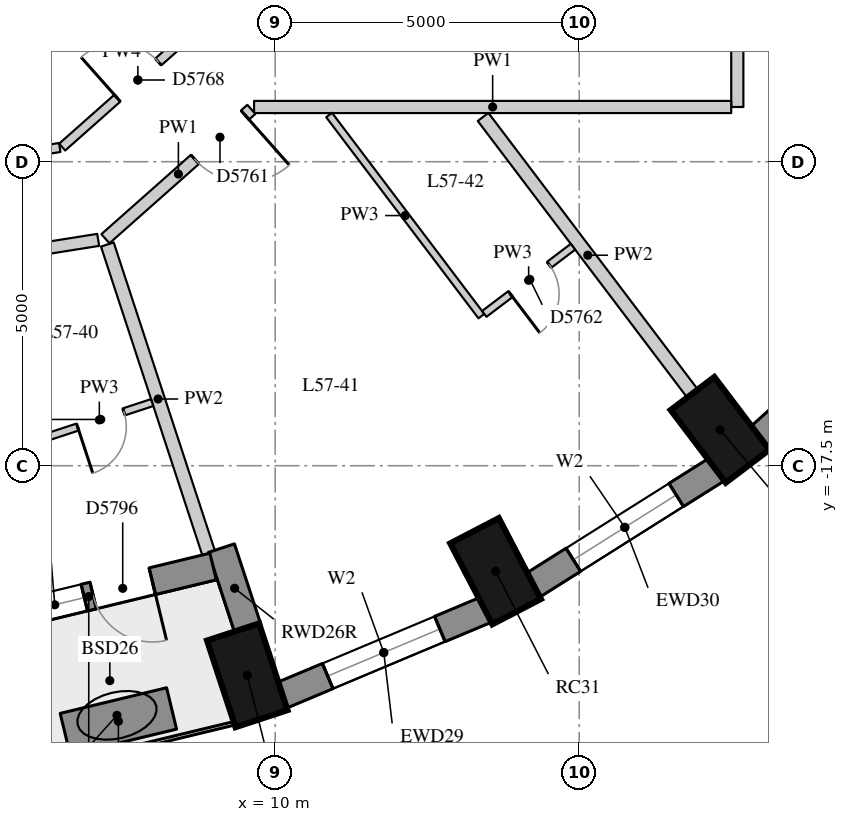
"""IFC4 building model, lengths in metres.
Left out: names, types, materials, properties, quantities, classifications, styles, units other than length and angle.
Written with IfcOpenShell. Run it as: python <this file> out.ifc"""

import sys

from ifc_helpers import new_model, si_unit, direction, frame, frame_2d, origin, origin_2d, place, context, subcontext, project, spatial, rectangle, extrude, element, fill, save


model = new_model("IFC4")
c1 = context("Model", 3, precision=1e-05, world=origin(), true_north=direction((0.0, 1.0)))
c2 = subcontext(c1, "Body", "Model", "MODEL_VIEW")
j1 = project(units=[si_unit("LENGTHUNIT", "METRE"), si_unit("PLANEANGLEUNIT", "RADIAN")], contexts=[c1])
p1 = place(None, origin())
s1 = spatial("IfcSite", under=j1, at=p1, CompositionType="ELEMENT")
p2 = place(p1, origin())
s2 = spatial("IfcBuilding", under=s1, at=p2, CompositionType="ELEMENT")
p3 = place(p2, frame((0.0, 0.0, 202.4)))
s3 = spatial("IfcBuildingStorey", under=s2, at=p3, CompositionType="ELEMENT", Elevation=202.4)
for number, where, z_axis, x_axis in (
    (1, (9.541, -20.948, 0.0), (0.0, 0.0, 1.0), (0.312, -0.95, 0.0)),
    (2, (13.625, -19.235, 0.0), (0.0, 0.0, 1.0), (0.462, -0.887, 0.0)),
    (3, (17.316, -16.911, 0.0), (0.0, 0.0, 1.0), (0.604, -0.797, 0.0)),
):
    element("IfcColumn", number, at=place(p3, frame(where, z_axis=z_axis, x_axis=x_axis)), inside=s3, PredefinedType="COLUMN", context=c2, shape_type="SweptSolid", body=[
        extrude(rectangle(XDim=1.5, YDim=0.9, at=origin_2d()), origin(), (0.0, 0.0, 1.0), 3.3),
    ])
p4 = place(p3, frame((10.103, -21.279, 0.0), z_axis=(0.0, 0.0, 1.0), x_axis=(0.922168222612, 0.386789050006, 0.0)))
e4 = element("IfcWall", 4, at=p4, inside=s3, PredefinedType="SOLIDWALL", context=c2, shape_type="SweptSolid", body=[
    extrude(rectangle(XDim=3.651, YDim=0.45, at=frame_2d((1.825, 0.0))), origin(), (0.0, 0.0, 1.0), 3.02),
])
p5 = place(p4, frame((0.825, 0.0, 0.4)))
e5 = element("IfcOpeningElement", 5, at=p5, cuts=e4, PredefinedType="OPENING", context=c2, shape_type="SweptSolid", body=[
    extrude(rectangle(XDim=2.0, YDim=1.75, at=frame_2d((1.0, 0.875))), frame((0.0, 0.235, 0.0), z_axis=(0.0, -1.0, 0.0), x_axis=(1.0, 0.0, 0.0)), (0.0, 0.0, 1.0), 0.47),
])
p6 = place(p3, frame((14.232, -19.47, 0.0), z_axis=(0.0, 0.0, 1.0), x_axis=(0.84614984472, 0.532945063098, 0.0)))
e6 = element("IfcWall", 6, at=p6, inside=s3, PredefinedType="SOLIDWALL", context=c2, shape_type="SweptSolid", body=[
    extrude(rectangle(XDim=3.586, YDim=0.45, at=frame_2d((1.793, 0.0))), origin(), (0.0, 0.0, 1.0), 3.02),
])
p7 = place(p6, frame((0.793, 0.0, 0.4)))
e7 = element("IfcOpeningElement", 7, at=p7, cuts=e6, PredefinedType="OPENING", context=c2, shape_type="SweptSolid", body=[
    extrude(rectangle(XDim=2.0, YDim=1.75, at=frame_2d((1.0, 0.875))), frame((0.0, 0.235, 0.0), z_axis=(0.0, -1.0, 0.0), x_axis=(1.0, 0.0, 0.0)), (0.0, 0.0, 1.0), 0.47),
])
p8 = place(p3, frame((17.953, -17.04, 0.0), z_axis=(0.0, 0.0, 1.0), x_axis=(0.743442727602, 0.668799604348, 0.0)))
e8 = element("IfcWall", 8, at=p8, inside=s3, PredefinedType="SOLIDWALL", context=c2, shape_type="SweptSolid", body=[
    extrude(rectangle(XDim=3.513, YDim=0.45, at=frame_2d((1.756, 0.0))), origin(), (0.0, 0.0, 1.0), 3.02),
])
p9 = place(p3, frame((9.55, -20.177, 0.0), z_axis=(0.0, 0.0, 1.0), x_axis=(-0.31201065878, 0.950078601384, 0.0)))
e9 = element("IfcWall", 9, at=p9, inside=s3, PredefinedType="SOLIDWALL", context=c2, shape_type="SweptSolid", body=[
    extrude(rectangle(XDim=1.39, YDim=0.45, at=frame_2d((0.695, 0.0))), origin(), (0.0, 0.0, 1.0), 3.02),
])
p10 = place(p3, frame((4.889, -20.146, 0.0), z_axis=(0.0, 0.0, 1.0), x_axis=(0.972004107579, 0.234963858602, 0.0)))
e10 = element("IfcWall", 10, at=p10, inside=s3, PredefinedType="SOLIDWALL", context=c2, shape_type="SweptSolid", body=[
    extrude(rectangle(XDim=4.207, YDim=0.45, at=frame_2d((2.104, 0.0))), origin(), (0.0, 0.0, 1.0), 3.02),
])
p11 = place(p10, frame((1.029, 0.0, 0.4)))
e11 = element("IfcOpeningElement", 11, at=p11, cuts=e10, PredefinedType="OPENING", context=c2, shape_type="SweptSolid", body=[
    extrude(rectangle(XDim=1.0, YDim=1.75, at=frame_2d((0.5, 0.875))), frame((0.0, 0.235, 0.0), z_axis=(0.0, -1.0, 0.0), x_axis=(1.0, 0.0, 0.0)), (0.0, 0.0, 1.0), 0.47),
])
p12 = place(p10, frame((2.179, 0.0, 0.0)))
e12 = element("IfcOpeningElement", 12, at=p12, cuts=e10, PredefinedType="OPENING", context=c2, shape_type="SweptSolid", body=[
    extrude(rectangle(XDim=1.0, YDim=2.15, at=frame_2d((0.5, 1.075))), frame((0.0, 0.235, 0.0), z_axis=(0.0, -1.0, 0.0), x_axis=(1.0, 0.0, 0.0)), (0.0, 0.0, 1.0), 0.47),
])
p13 = place(p3, frame((6.546, -21.914, 0.0), z_axis=(0.0, 0.0, 1.0), x_axis=(0.97215043642, 0.234357694494, 0.0)))
e13 = element("IfcWall", 13, at=p13, inside=s3, PredefinedType="USERDEFINED", context=c2, shape_type="SweptSolid", body=[
    extrude(rectangle(XDim=1.8, YDim=0.7, at=frame_2d((0.9, 0.0))), origin(), (0.0, 0.0, 1.0), 0.75),
])
p14 = place(p3, frame((17.6, -4.617, 0.0), z_axis=(0.0, 0.0, 1.0), x_axis=(0.0, -1.0, 0.0)))
e14 = element("IfcWall", 14, at=p14, inside=s3, PredefinedType="PARTITIONING", context=c2, shape_type="SweptSolid", body=[
    extrude(rectangle(XDim=6.983, YDim=0.2, at=frame_2d((3.492, 0.0))), origin(), (0.0, 0.0, 1.0), 3.02),
])
p15 = place(p14, frame((2.592, 0.0, 0.0)))
e15 = element("IfcOpeningElement", 15, at=p15, cuts=e14, PredefinedType="OPENING", context=c2, shape_type="SweptSolid", body=[
    extrude(rectangle(XDim=1.8, YDim=2.1, at=frame_2d((0.9, 1.05))), frame((0.0, 0.11, 0.0), z_axis=(0.0, -1.0, 0.0), x_axis=(1.0, 0.0, 0.0)), (0.0, 0.0, 1.0), 0.22),
])
p16 = place(p3, frame((17.5, -11.6, 0.0), z_axis=(0.0, 0.0, 1.0), x_axis=(-1.0, 0.0, 0.0)))
e16 = element("IfcWall", 16, at=p16, inside=s3, PredefinedType="PARTITIONING", context=c2, shape_type="SweptSolid", body=[
    extrude(rectangle(XDim=7.847, YDim=0.2, at=frame_2d((3.923, 0.0))), origin(), (0.0, 0.0, 1.0), 3.02),
])
p17 = place(p3, frame((9.608, -11.64, 0.0), z_axis=(0.0, 0.0, 1.0), x_axis=(-0.748412200225, -0.663233879227, 0.0)))
e17 = element("IfcWall", 17, at=p17, inside=s3, PredefinedType="PARTITIONING", context=c2, shape_type="SweptSolid", body=[
    extrude(rectangle(XDim=3.207, YDim=0.2, at=frame_2d((1.604, 0.0))), origin(), (0.0, 0.0, 1.0), 3.02),
])
p18 = place(p17, frame((0.14, 0.0, 0.0)))
e18 = element("IfcOpeningElement", 18, at=p18, cuts=e17, PredefinedType="OPENING", context=c2, shape_type="SweptSolid", body=[
    extrude(rectangle(XDim=1.1, YDim=2.1, at=frame_2d((0.55, 1.05))), frame((0.0, 0.11, 0.0), z_axis=(0.0, -1.0, 0.0), x_axis=(1.0, 0.0, 0.0)), (0.0, 0.0, 1.0), 0.22),
])
p19 = place(p3, frame((7.089, -13.786, 0.0), z_axis=(0.0, 0.0, 1.0), x_axis=(-0.987636270411, -0.156762869867, 0.0)))
e19 = element("IfcWall", 19, at=p19, inside=s3, PredefinedType="PARTITIONING", context=c2, shape_type="SweptSolid", body=[
    extrude(rectangle(XDim=6.469, YDim=0.2, at=frame_2d((3.235, 0.0))), origin(), (0.0, 0.0, 1.0), 2.42),
])
p20 = place(p19, frame((5.016, 0.0, 0.0)))
e20 = element("IfcOpeningElement", 20, at=p20, cuts=e19, PredefinedType="OPENING", context=c2, shape_type="SweptSolid", body=[
    extrude(rectangle(XDim=1.1, YDim=2.1, at=frame_2d((0.55, 1.05))), frame((0.0, 0.11, 0.0), z_axis=(0.0, -1.0, 0.0), x_axis=(1.0, 0.0, 0.0)), (0.0, 0.0, 1.0), 0.22),
])
p21 = place(p3, frame((8.987, -10.052, 0.0), z_axis=(0.0, 0.0, 1.0), x_axis=(-0.74833949077, -0.66331591761, 0.0)))
e21 = element("IfcWall", 21, at=p21, inside=s3, PredefinedType="PARTITIONING", context=c2, shape_type="SweptSolid", body=[
    extrude(rectangle(XDim=3.328, YDim=0.15, at=frame_2d((1.664, 0.0))), origin(), (0.0, 0.0, 1.0), 3.02),
])
p22 = place(p21, frame((1.214, 0.0, 0.0)))
e22 = element("IfcOpeningElement", 22, at=p22, cuts=e21, PredefinedType="OPENING", context=c2, shape_type="SweptSolid", body=[
    extrude(rectangle(XDim=0.9, YDim=2.1, at=frame_2d((0.45, 1.05))), frame((0.0, 0.085, 0.0), z_axis=(0.0, -1.0, 0.0), x_axis=(1.0, 0.0, 0.0)), (0.0, 0.0, 1.0), 0.17),
])
p23 = place(p3, frame((6.457, -12.266, 0.0), z_axis=(0.0, 0.0, 1.0), x_axis=(-0.987639766053, -0.156740845063, 0.0)))
e23 = element("IfcWall", 23, at=p23, inside=s3, PredefinedType="PARTITIONING", context=c2, shape_type="SweptSolid", body=[
    extrude(rectangle(XDim=2.69, YDim=0.15, at=frame_2d((1.345, 0.0))), origin(), (0.0, 0.0, 1.0), 3.02),
])
p24 = place(p3, frame((8.908, -18.944, 0.0), z_axis=(0.0, 0.0, 1.0), x_axis=(-0.311910788491, 0.950111393481, 0.0)))
e24 = element("IfcWall", 24, at=p24, inside=s3, PredefinedType="PARTITIONING", context=c2, shape_type="SweptSolid", body=[
    extrude(rectangle(XDim=5.348, YDim=0.22, at=frame_2d((2.674, 0.0))), origin(), (0.0, 0.0, 1.0), 3.02),
])
p25 = place(p3, frame((16.863, -16.312, 0.0), z_axis=(0.0, 0.0, 1.0), x_axis=(-0.603636051313, 0.797260006243, 0.0)))
e25 = element("IfcWall", 25, at=p25, inside=s3, PredefinedType="PARTITIONING", context=c2, shape_type="SweptSolid", body=[
    extrude(rectangle(XDim=5.706, YDim=0.22, at=frame_2d((2.853, 0.0))), origin(), (0.0, 0.0, 1.0), 3.02),
])
p26 = place(p3, frame((10.887, -11.732, 0.0), z_axis=(0.0, 0.0, 1.0), x_axis=(0.603646932038, -0.797251767913, 0.0)))
e26 = element("IfcWall", 26, at=p26, inside=s3, PredefinedType="PARTITIONING", context=c2, shape_type="SweptSolid", body=[
    extrude(rectangle(XDim=4.149, YDim=0.12, at=frame_2d((2.074, 0.0))), origin(), (0.0, 0.0, 1.0), 3.02),
])
p27 = place(p3, frame((6.239, -17.032, 0.0), z_axis=(0.0, 0.0, 1.0), x_axis=(0.950127811882, 0.311860771962, 0.0)))
e27 = element("IfcWall", 27, at=p27, inside=s3, PredefinedType="PARTITIONING", context=c2, shape_type="SweptSolid", body=[
    extrude(rectangle(XDim=1.83, YDim=0.12, at=frame_2d((0.915, 0.0))), origin(), (0.0, 0.0, 1.0), 3.02),
])
p28 = place(p27, frame((0.54, 0.0, 0.0)))
e28 = element("IfcOpeningElement", 28, at=p28, cuts=e27, PredefinedType="OPENING", context=c2, shape_type="SweptSolid", body=[
    extrude(rectangle(XDim=0.8, YDim=2.1, at=frame_2d((0.4, 1.05))), frame((0.0, 0.07, 0.0), z_axis=(0.0, -1.0, 0.0), x_axis=(1.0, 0.0, 0.0)), (0.0, 0.0, 1.0), 0.14),
])
p29 = place(p3, frame((13.439, -15.003, 0.0), z_axis=(0.0, 0.0, 1.0), x_axis=(0.797238062708, 0.603665032422, 0.0)))
e29 = element("IfcWall", 29, at=p29, inside=s3, PredefinedType="PARTITIONING", context=c2, shape_type="SweptSolid", body=[
    extrude(rectangle(XDim=1.83, YDim=0.12, at=frame_2d((0.915, 0.0))), origin(), (0.0, 0.0, 1.0), 3.02),
])
p30 = place(p29, frame((0.54, 0.0, 0.0)))
e30 = element("IfcOpeningElement", 30, at=p30, cuts=e29, PredefinedType="OPENING", context=c2, shape_type="SweptSolid", body=[
    extrude(rectangle(XDim=0.8, YDim=2.1, at=frame_2d((0.4, 1.05))), frame((0.0, 0.07, 0.0), z_axis=(0.0, -1.0, 0.0), x_axis=(1.0, 0.0, 0.0)), (0.0, 0.0, 1.0), 0.14),
])
p31 = place(p5, origin())
e31 = element("IfcWindow", 31, at=p31, inside=s3, PartitioningType="SINGLE_PANEL", PredefinedType="WINDOW", context=c2, shape_type="SweptSolid", body=[
    extrude(rectangle(XDim=2.0, YDim=1.75, at=frame_2d((1.0, 0.875))), frame((0.0, 0.035, 0.0), z_axis=(0.0, -1.0, 0.0), x_axis=(1.0, 0.0, 0.0)), (0.0, 0.0, 1.0), 0.06),
])
fill(e5, e31)
p32 = place(p7, origin())
e32 = element("IfcWindow", 32, at=p32, inside=s3, PartitioningType="SINGLE_PANEL", PredefinedType="WINDOW", context=c2, shape_type="SweptSolid", body=[
    extrude(rectangle(XDim=2.0, YDim=1.75, at=frame_2d((1.0, 0.875))), frame((0.0, 0.035, 0.0), z_axis=(0.0, -1.0, 0.0), x_axis=(1.0, 0.0, 0.0)), (0.0, 0.0, 1.0), 0.06),
])
fill(e7, e32)
p33 = place(p11, origin())
e33 = element("IfcWindow", 33, at=p33, inside=s3, PartitioningType="SINGLE_PANEL", PredefinedType="WINDOW", context=c2, shape_type="SweptSolid", body=[
    extrude(rectangle(XDim=1.0, YDim=1.75, at=frame_2d((0.5, 0.875))), frame((0.0, 0.035, 0.0), z_axis=(0.0, -1.0, 0.0), x_axis=(1.0, 0.0, 0.0)), (0.0, 0.0, 1.0), 0.06),
])
fill(e11, e33)
p34 = place(p12, frame((1.0, 0.0, 0.0), z_axis=(0.0, 0.0, 1.0), x_axis=(-1.0, 0.0, 0.0)))
e34 = element("IfcDoor", 34, at=p34, inside=s3, OperationType="SINGLE_SWING_LEFT", PredefinedType="DOOR", context=c2, shape_type="SweptSolid", body=[
    extrude(rectangle(XDim=1.0, YDim=2.15, at=frame_2d((0.5, 1.075))), frame((0.0, 0.075, 0.0), z_axis=(0.0, -1.0, 0.0), x_axis=(1.0, 0.0, 0.0)), (0.0, 0.0, 1.0), 0.05),
])
fill(e12, e34)
p35 = place(p28, origin())
e35 = element("IfcDoor", 35, at=p35, inside=s3, OperationType="SINGLE_SWING_RIGHT", PredefinedType="DOOR", context=c2, shape_type="SweptSolid", body=[
    extrude(rectangle(XDim=0.8, YDim=2.1, at=frame_2d((0.4, 1.05))), frame((0.0, 0.025, 0.0), z_axis=(0.0, -1.0, 0.0), x_axis=(1.0, 0.0, 0.0)), (0.0, 0.0, 1.0), 0.05),
])
fill(e28, e35)
p36 = place(p18, origin())
e36 = element("IfcDoor", 36, at=p36, inside=s3, OperationType="SINGLE_SWING_LEFT", PredefinedType="DOOR", context=c2, shape_type="SweptSolid", body=[
    extrude(rectangle(XDim=1.1, YDim=2.1, at=frame_2d((0.55, 1.05))), frame((0.0, 0.025, 0.0), z_axis=(0.0, -1.0, 0.0), x_axis=(1.0, 0.0, 0.0)), (0.0, 0.0, 1.0), 0.05),
])
fill(e18, e36)
p37 = place(p30, origin())
e37 = element("IfcDoor", 37, at=p37, inside=s3, OperationType="SINGLE_SWING_RIGHT", PredefinedType="DOOR", context=c2, shape_type="SweptSolid", body=[
    extrude(rectangle(XDim=0.8, YDim=2.1, at=frame_2d((0.4, 1.05))), frame((0.0, 0.025, 0.0), z_axis=(0.0, -1.0, 0.0), x_axis=(1.0, 0.0, 0.0)), (0.0, 0.0, 1.0), 0.05),
])
fill(e30, e37)
p38 = place(p22, origin())
e38 = element("IfcDoor", 38, at=p38, inside=s3, OperationType="SINGLE_SWING_LEFT", PredefinedType="DOOR", context=c2, shape_type="SweptSolid", body=[
    extrude(rectangle(XDim=0.9, YDim=2.1, at=frame_2d((0.45, 1.05))), frame((0.0, 0.025, 0.0), z_axis=(0.0, -1.0, 0.0), x_axis=(1.0, 0.0, 0.0)), (0.0, 0.0, 1.0), 0.05),
])
fill(e22, e38)
save(model, sys.argv[1])
